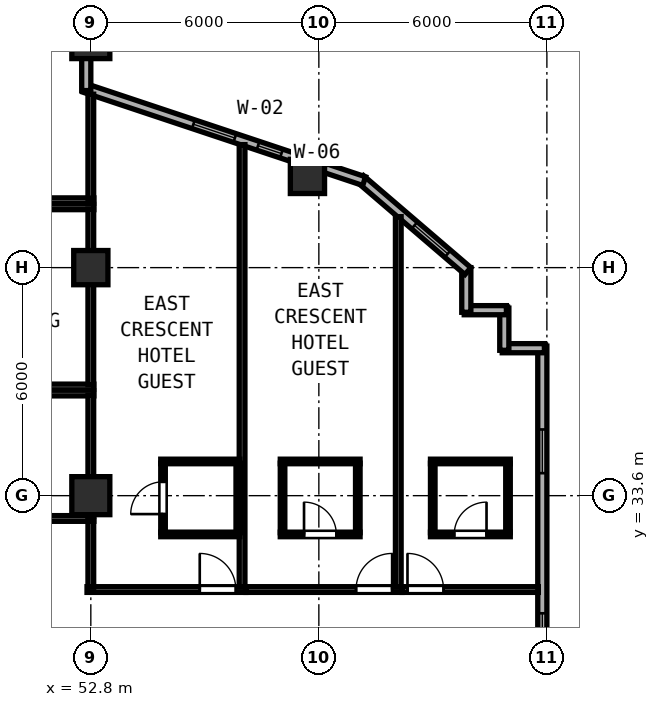
"""IFC4 building model, lengths in metres.
Left out: names, types, materials, properties, quantities, classifications, styles, units other than length and angle.
Written with IfcOpenShell. Run it as: python <this file> out.ifc"""

import sys

from ifc_helpers import new_model, si_unit, direction, frame, frame_2d, origin, origin_2d, place, context, subcontext, project, spatial, rectangle, hollow_rectangle, extrude, element, fill, save


model = new_model("IFC4")
c1 = context("Model", 3, precision=1e-05, world=origin(), true_north=direction((0.0, 1.0)))
c2 = subcontext(c1, "Body", "Model", "MODEL_VIEW")
j1 = project(units=[si_unit("LENGTHUNIT", "METRE"), si_unit("PLANEANGLEUNIT", "RADIAN")], contexts=[c1])
p1 = place(None, origin())
s1 = spatial("IfcSite", under=j1, at=p1, CompositionType="ELEMENT")
p2 = place(p1, origin())
s2 = spatial("IfcBuilding", under=s1, at=p2, CompositionType="ELEMENT")
p3 = place(p2, frame((0.0, 0.0, 121.2)))
s3 = spatial("IfcBuildingStorey", under=s2, at=p3, CompositionType="ELEMENT", Elevation=121.2)
for number, where, z_axis, x_axis in (
    (1, (52.8, 33.6, 0.0), (0.0, 0.0, 1.0), (1.0, 0.0, 0.0)),
    (2, (52.8, 45.6, 0.0), (0.0, 0.0, 1.0), (1.0, 0.0, 0.0)),
):
    element("IfcColumn", number, at=place(p3, frame(where, z_axis=z_axis, x_axis=x_axis)), inside=s3, PredefinedType="COLUMN", context=c2, shape_type="SweptSolid", body=[
        extrude(hollow_rectangle(XDim=1.0, YDim=1.0, WallThickness=0.038, at=origin_2d()), origin(), (0.0, 0.0, 1.0), 3.8),
    ])
for number, where, z_axis, x_axis in (
    (3, (52.8, 39.6, 0.0), (0.0, 0.0, 1.0), (1.0, 0.0, 0.0)),
    (4, (58.5, 42.0, 0.0), (0.0, 0.0, 1.0), (1.0, 0.0, 0.0)),
):
    element("IfcColumn", number, at=place(p3, frame(where, z_axis=z_axis, x_axis=x_axis)), inside=s3, PredefinedType="COLUMN", context=c2, shape_type="SweptSolid", body=[
        extrude(hollow_rectangle(XDim=0.9, YDim=0.9, WallThickness=0.034, at=origin_2d()), origin(), (0.0, 0.0, 1.0), 3.8),
    ])
p4 = place(p3, frame((64.68, 28.092, 0.0), z_axis=(0.0, 0.0, 1.0), x_axis=(0.0, 1.0, 0.0)))
e5 = element("IfcWall", 5, at=p4, inside=s3, PredefinedType="SOLIDWALL", context=c2, shape_type="SweptSolid", body=[
    extrude(rectangle(XDim=9.443, YDim=0.24, at=frame_2d((4.721, 0.0))), origin(), (0.0, 0.0, 1.0), 3.6),
])
p5 = place(p4, frame((1.263, 0.0, 0.85)))
e6 = element("IfcOpeningElement", 6, at=p5, cuts=e5, PredefinedType="OPENING", context=c2, shape_type="SweptSolid", body=[
    extrude(rectangle(XDim=1.15, YDim=1.8, at=frame_2d((0.575, 0.9))), frame((0.0, 0.13, 0.0), z_axis=(0.0, -1.0, 0.0), x_axis=(1.0, 0.0, 0.0)), (0.0, 0.0, 1.0), 0.26),
])
p6 = place(p4, frame((6.1, 0.0, 0.85)))
e7 = element("IfcOpeningElement", 7, at=p6, cuts=e5, PredefinedType="OPENING", context=c2, shape_type="SweptSolid", body=[
    extrude(rectangle(XDim=1.15, YDim=1.8, at=frame_2d((0.575, 0.9))), frame((0.0, 0.13, 0.0), z_axis=(0.0, -1.0, 0.0), x_axis=(1.0, 0.0, 0.0)), (0.0, 0.0, 1.0), 0.26),
])
p7 = place(p3, frame((64.735, 37.48, 0.0), z_axis=(0.0, 0.0, 1.0), x_axis=(-1.0, 0.0, 0.0)))
e8 = element("IfcWall", 8, at=p7, inside=s3, PredefinedType="SOLIDWALL", context=c2, shape_type="SweptSolid", body=[
    extrude(rectangle(XDim=1.11, YDim=0.24, at=frame_2d((0.555, 0.0))), origin(), (0.0, 0.0, 1.0), 3.6),
])
p8 = place(p3, frame((63.68, 37.425, 0.0), z_axis=(0.0, 0.0, 1.0), x_axis=(0.0, 1.0, 0.0)))
e9 = element("IfcWall", 9, at=p8, inside=s3, PredefinedType="SOLIDWALL", context=c2, shape_type="SweptSolid", body=[
    extrude(rectangle(XDim=1.11, YDim=0.24, at=frame_2d((0.555, 0.0))), origin(), (0.0, 0.0, 1.0), 3.6),
])
p9 = place(p3, frame((63.735, 38.48, 0.0), z_axis=(0.0, 0.0, 1.0), x_axis=(-1.0, 0.0, 0.0)))
e10 = element("IfcWall", 10, at=p9, inside=s3, PredefinedType="SOLIDWALL", context=c2, shape_type="SweptSolid", body=[
    extrude(rectangle(XDim=1.11, YDim=0.24, at=frame_2d((0.555, 0.0))), origin(), (0.0, 0.0, 1.0), 3.6),
])
p10 = place(p3, frame((62.68, 38.425, 0.0), z_axis=(0.0, 0.0, 1.0), x_axis=(0.0, 1.0, 0.0)))
e11 = element("IfcWall", 11, at=p10, inside=s3, PredefinedType="SOLIDWALL", context=c2, shape_type="SweptSolid", body=[
    extrude(rectangle(XDim=1.175, YDim=0.24, at=frame_2d((0.587, 0.0))), origin(), (0.0, 0.0, 1.0), 3.6),
])
p11 = place(p3, frame((62.722, 39.509, 0.0), z_axis=(0.0, 0.0, 1.0), x_axis=(-0.759247334792, 0.650802185469, 0.0)))
e12 = element("IfcWall", 12, at=p11, inside=s3, PredefinedType="SOLIDWALL", context=c2, shape_type="SweptSolid", body=[
    extrude(rectangle(XDim=3.719, YDim=0.24, at=frame_2d((1.86, 0.0))), origin(), (0.0, 0.0, 1.0), 3.6),
])
p12 = place(p11, frame((0.7, 0.0, 0.85)))
e13 = element("IfcOpeningElement", 13, at=p12, cuts=e12, PredefinedType="OPENING", context=c2, shape_type="SweptSolid", body=[
    extrude(rectangle(XDim=1.15, YDim=1.8, at=frame_2d((0.575, 0.9))), frame((0.0, 0.13, 0.0), z_axis=(0.0, -1.0, 0.0), x_axis=(1.0, 0.0, 0.0)), (0.0, 0.0, 1.0), 0.26),
])
p13 = place(p3, frame((59.992, 41.876, 0.0), z_axis=(0.0, 0.0, 1.0), x_axis=(-0.948661238983, 0.316293935527, 0.0)))
e14 = element("IfcWall", 14, at=p13, inside=s3, PredefinedType="SOLIDWALL", context=c2, shape_type="SweptSolid", body=[
    extrude(rectangle(XDim=1.107, YDim=0.24, at=frame_2d((0.553, 0.0))), origin(), (0.0, 0.0, 1.0), 3.6),
])
p14 = place(p3, frame((58.295, 42.442, 0.0), z_axis=(0.0, 0.0, 1.0), x_axis=(-0.948687385027, 0.316215504823, 0.0)))
e15 = element("IfcWall", 15, at=p14, inside=s3, PredefinedType="SOLIDWALL", context=c2, shape_type="SweptSolid", body=[
    extrude(rectangle(XDim=5.973, YDim=0.24, at=frame_2d((2.987, 0.0))), origin(), (0.0, 0.0, 1.0), 3.145),
])
p15 = place(p14, frame((1.796, 0.0, 0.85)))
e16 = element("IfcOpeningElement", 16, at=p15, cuts=e15, PredefinedType="OPENING", context=c2, shape_type="SweptSolid", body=[
    extrude(rectangle(XDim=1.15, YDim=1.8, at=frame_2d((0.575, 0.9))), frame((0.0, 0.13, 0.0), z_axis=(0.0, -1.0, 0.0), x_axis=(1.0, 0.0, 0.0)), (0.0, 0.0, 1.0), 0.26),
])
p16 = place(p14, frame((0.505, 0.0, 0.85)))
e17 = element("IfcOpeningElement", 17, at=p16, cuts=e15, PredefinedType="OPENING", context=c2, shape_type="SweptSolid", body=[
    extrude(rectangle(XDim=0.65, YDim=1.75, at=frame_2d((0.325, 0.875))), frame((0.0, 0.13, 0.0), z_axis=(0.0, -1.0, 0.0), x_axis=(1.0, 0.0, 0.0)), (0.0, 0.0, 1.0), 0.26),
])
p17 = place(p3, frame((52.68, 44.259, 0.0), z_axis=(0.0, 0.0, 1.0), x_axis=(0.0, 1.0, 0.0)))
e18 = element("IfcWall", 18, at=p17, inside=s3, PredefinedType="SOLIDWALL", context=c2, shape_type="SweptSolid", body=[
    extrude(rectangle(XDim=0.849, YDim=0.24, at=frame_2d((0.425, 0.0))), origin(), (0.0, 0.0, 1.0), 3.145),
])
for number, where, z_axis, x_axis in (
    (19, (49.08, 36.3, 0.0), (0.0, 0.0, 1.0), (1.0, 0.0, 0.0)),
    (20, (49.08, 33.0, 0.0), (0.0, 0.0, 1.0), (1.0, 0.0, 0.0)),
):
    element("IfcWall", number, at=place(p3, frame(where, z_axis=z_axis, x_axis=x_axis)), inside=s3, PredefinedType="PARTITIONING", context=c2, shape_type="SweptSolid", body=[
        extrude(rectangle(XDim=3.8, YDim=0.15, at=frame_2d((1.9, 0.0))), origin(), (0.0, 0.0, 1.0), 3.6),
    ])
p18 = place(p3, frame((52.8, 33.06, 0.0), z_axis=(0.0, 0.0, 1.0), x_axis=(0.0, 1.0, 0.0)))
e21 = element("IfcWall", 21, at=p18, inside=s3, PredefinedType="PARTITIONING", context=c2, shape_type="SweptSolid", body=[
    extrude(rectangle(XDim=3.18, YDim=0.15, at=frame_2d((1.59, 0.0))), origin(), (0.0, 0.0, 1.0), 3.145),
])
for number, where, z_axis, x_axis in (
    (22, (49.08, 41.2, 0.0), (0.0, 0.0, 1.0), (1.0, 0.0, 0.0)),
    (23, (49.08, 36.46, 0.0), (0.0, 0.0, 1.0), (1.0, 0.0, 0.0)),
):
    element("IfcWall", number, at=place(p3, frame(where, z_axis=z_axis, x_axis=x_axis)), inside=s3, PredefinedType="PARTITIONING", context=c2, shape_type="SweptSolid", body=[
        extrude(rectangle(XDim=3.8, YDim=0.15, at=frame_2d((1.9, 0.0))), origin(), (0.0, 0.0, 1.0), 3.6),
    ])
p19 = place(p3, frame((52.8, 36.52, 0.0), z_axis=(0.0, 0.0, 1.0), x_axis=(0.0, 1.0, 0.0)))
e24 = element("IfcWall", 24, at=p19, inside=s3, PredefinedType="PARTITIONING", context=c2, shape_type="SweptSolid", body=[
    extrude(rectangle(XDim=4.62, YDim=0.15, at=frame_2d((2.31, 0.0))), origin(), (0.0, 0.0, 1.0), 3.145),
])
p20 = place(p3, frame((49.08, 41.36, 0.0), z_axis=(0.0, 0.0, 1.0), x_axis=(1.0, 0.0, 0.0)))
e25 = element("IfcWall", 25, at=p20, inside=s3, PredefinedType="PARTITIONING", context=c2, shape_type="SweptSolid", body=[
    extrude(rectangle(XDim=3.8, YDim=0.15, at=frame_2d((1.9, 0.0))), origin(), (0.0, 0.0, 1.0), 3.6),
])
p21 = place(p3, frame((52.8, 41.42, 0.0), z_axis=(0.0, 0.0, 1.0), x_axis=(0.0, 1.0, 0.0)))
e26 = element("IfcWall", 26, at=p21, inside=s3, PredefinedType="PARTITIONING", context=c2, shape_type="SweptSolid", body=[
    extrude(rectangle(XDim=2.743, YDim=0.15, at=frame_2d((1.372, 0.0))), origin(), (0.0, 0.0, 1.0), 3.145),
])
p22 = place(p3, frame((52.7, 31.13, 0.0), z_axis=(0.0, 0.0, 1.0), x_axis=(1.0, 0.0, 0.0)))
e27 = element("IfcWall", 27, at=p22, inside=s3, PredefinedType="PARTITIONING", context=c2, shape_type="SweptSolid", body=[
    extrude(rectangle(XDim=4.18, YDim=0.15, at=frame_2d((2.09, 0.0))), origin(), (0.0, 0.0, 1.0), 3.6),
])
p23 = place(p22, frame((2.966, 0.0, 0.0)))
e28 = element("IfcOpeningElement", 28, at=p23, cuts=e27, PredefinedType="OPENING", context=c2, shape_type="SweptSolid", body=[
    extrude(rectangle(XDim=0.95, YDim=2.15, at=frame_2d((0.475, 1.075))), frame((0.0, 0.085, 0.0), z_axis=(0.0, -1.0, 0.0), x_axis=(1.0, 0.0, 0.0)), (0.0, 0.0, 1.0), 0.17),
])
p24 = place(p3, frame((52.8, 31.19, 0.0), z_axis=(0.0, 0.0, 1.0), x_axis=(0.0, 1.0, 0.0)))
e29 = element("IfcWall", 29, at=p24, inside=s3, PredefinedType="PARTITIONING", context=c2, shape_type="SweptSolid", body=[
    extrude(rectangle(XDim=1.75, YDim=0.15, at=frame_2d((0.875, 0.0))), origin(), (0.0, 0.0, 1.0), 3.145),
])
p25 = place(p3, frame((56.78, 31.19, 0.0), z_axis=(0.0, 0.0, 1.0), x_axis=(0.0, 1.0, 0.0)))
e30 = element("IfcWall", 30, at=p25, inside=s3, PredefinedType="PARTITIONING", context=c2, shape_type="SweptSolid", body=[
    extrude(rectangle(XDim=11.646, YDim=0.15, at=frame_2d((5.823, 0.0))), origin(), (0.0, 0.0, 1.0), 3.6),
])
for number, where, z_axis, x_axis in (
    (31, (54.64, 34.5, 0.0), (0.0, 0.0, 1.0), (1.0, 0.0, 0.0)),
    (32, (54.64, 32.58, 0.0), (0.0, 0.0, 1.0), (1.0, 0.0, 0.0)),
):
    element("IfcWall", number, at=place(p3, frame(where, z_axis=z_axis, x_axis=x_axis)), inside=s3, PredefinedType="PARTITIONING", context=c2, shape_type="SweptSolid", body=[
        extrude(rectangle(XDim=2.08, YDim=0.12, at=frame_2d((1.04, 0.0))), origin(), (0.0, 0.0, 1.0), 3.6),
    ])
p26 = place(p3, frame((54.7, 32.625, 0.0), z_axis=(0.0, 0.0, 1.0), x_axis=(0.0, 1.0, 0.0)))
e33 = element("IfcWall", 33, at=p26, inside=s3, PredefinedType="PARTITIONING", context=c2, shape_type="SweptSolid", body=[
    extrude(rectangle(XDim=1.83, YDim=0.12, at=frame_2d((0.915, 0.0))), origin(), (0.0, 0.0, 1.0), 3.6),
])
p27 = place(p26, frame((1.34, 0.0, 0.0), z_axis=(0.0, 0.0, 1.0), x_axis=(-1.0, 0.0, 0.0)))
e34 = element("IfcOpeningElement", 34, at=p27, cuts=e33, PredefinedType="OPENING", context=c2, shape_type="SweptSolid", body=[
    extrude(rectangle(XDim=0.85, YDim=2.1, at=frame_2d((0.425, 1.05))), frame((0.0, 0.07, 0.0), z_axis=(0.0, -1.0, 0.0), x_axis=(1.0, 0.0, 0.0)), (0.0, 0.0, 1.0), 0.14),
])
p28 = place(p3, frame((56.68, 32.625, 0.0), z_axis=(0.0, 0.0, 1.0), x_axis=(0.0, 1.0, 0.0)))
e35 = element("IfcWall", 35, at=p28, inside=s3, PredefinedType="PARTITIONING", context=c2, shape_type="SweptSolid", body=[
    extrude(rectangle(XDim=1.83, YDim=0.12, at=frame_2d((0.915, 0.0))), origin(), (0.0, 0.0, 1.0), 3.6),
])
p29 = place(p3, frame((56.882, 31.13, 0.0), z_axis=(0.0, 0.0, 1.0), x_axis=(1.0, 0.0, 0.0)))
e36 = element("IfcWall", 36, at=p29, inside=s3, PredefinedType="PARTITIONING", context=c2, shape_type="SweptSolid", body=[
    extrude(rectangle(XDim=4.108, YDim=0.15, at=frame_2d((2.054, 0.0))), origin(), (0.0, 0.0, 1.0), 3.6),
])
p30 = place(p29, frame((2.896, 0.0, 0.0)))
e37 = element("IfcOpeningElement", 37, at=p30, cuts=e36, PredefinedType="OPENING", context=c2, shape_type="SweptSolid", body=[
    extrude(rectangle(XDim=0.95, YDim=2.15, at=frame_2d((0.475, 1.075))), frame((0.0, 0.085, 0.0), z_axis=(0.0, -1.0, 0.0), x_axis=(1.0, 0.0, 0.0)), (0.0, 0.0, 1.0), 0.17),
])
p31 = place(p3, frame((60.89, 31.19, 0.0), z_axis=(0.0, 0.0, 1.0), x_axis=(0.0, 1.0, 0.0)))
e38 = element("IfcWall", 38, at=p31, inside=s3, PredefinedType="PARTITIONING", context=c2, shape_type="SweptSolid", body=[
    extrude(rectangle(XDim=9.751, YDim=0.15, at=frame_2d((4.875, 0.0))), origin(), (0.0, 0.0, 1.0), 3.6),
])
p32 = place(p3, frame((57.785, 34.5, 0.0), z_axis=(0.0, 0.0, 1.0), x_axis=(1.0, 0.0, 0.0)))
e39 = element("IfcWall", 39, at=p32, inside=s3, PredefinedType="PARTITIONING", context=c2, shape_type="SweptSolid", body=[
    extrude(rectangle(XDim=2.1, YDim=0.12, at=frame_2d((1.05, 0.0))), origin(), (0.0, 0.0, 1.0), 3.6),
])
p33 = place(p3, frame((57.785, 32.58, 0.0), z_axis=(0.0, 0.0, 1.0), x_axis=(1.0, 0.0, 0.0)))
e40 = element("IfcWall", 40, at=p33, inside=s3, PredefinedType="PARTITIONING", context=c2, shape_type="SweptSolid", body=[
    extrude(rectangle(XDim=2.1, YDim=0.12, at=frame_2d((1.05, 0.0))), origin(), (0.0, 0.0, 1.0), 3.6),
])
p34 = place(p33, frame((0.625, 0.0, 0.0)))
e41 = element("IfcOpeningElement", 41, at=p34, cuts=e40, PredefinedType="OPENING", context=c2, shape_type="SweptSolid", body=[
    extrude(rectangle(XDim=0.85, YDim=2.1, at=frame_2d((0.425, 1.05))), frame((0.0, 0.07, 0.0), z_axis=(0.0, -1.0, 0.0), x_axis=(1.0, 0.0, 0.0)), (0.0, 0.0, 1.0), 0.14),
])
for number, where, z_axis, x_axis in (
    (42, (57.845, 32.625, 0.0), (0.0, 0.0, 1.0), (0.0, 1.0, 0.0)),
    (43, (59.825, 32.625, 0.0), (0.0, 0.0, 1.0), (0.0, 1.0, 0.0)),
):
    element("IfcWall", number, at=place(p3, frame(where, z_axis=z_axis, x_axis=x_axis)), inside=s3, PredefinedType="PARTITIONING", context=c2, shape_type="SweptSolid", body=[
        extrude(rectangle(XDim=1.83, YDim=0.12, at=frame_2d((0.915, 0.0))), origin(), (0.0, 0.0, 1.0), 3.6),
    ])
p35 = place(p3, frame((60.992, 31.13, 0.0), z_axis=(0.0, 0.0, 1.0), x_axis=(1.0, 0.0, 0.0)))
e44 = element("IfcWall", 44, at=p35, inside=s3, PredefinedType="PARTITIONING", context=c2, shape_type="SweptSolid", body=[
    extrude(rectangle(XDim=3.583, YDim=0.15, at=frame_2d((1.792, 0.0))), origin(), (0.0, 0.0, 1.0), 3.6),
])
p36 = place(p35, frame((0.14, 0.0, 0.0)))
e45 = element("IfcOpeningElement", 45, at=p36, cuts=e44, PredefinedType="OPENING", context=c2, shape_type="SweptSolid", body=[
    extrude(rectangle(XDim=0.95, YDim=2.15, at=frame_2d((0.475, 1.075))), frame((0.0, 0.085, 0.0), z_axis=(0.0, -1.0, 0.0), x_axis=(1.0, 0.0, 0.0)), (0.0, 0.0, 1.0), 0.17),
])
p37 = place(p3, frame((61.737, 34.5, 0.0), z_axis=(0.0, 0.0, 1.0), x_axis=(1.0, 0.0, 0.0)))
e46 = element("IfcWall", 46, at=p37, inside=s3, PredefinedType="PARTITIONING", context=c2, shape_type="SweptSolid", body=[
    extrude(rectangle(XDim=2.1, YDim=0.12, at=frame_2d((1.05, 0.0))), origin(), (0.0, 0.0, 1.0), 3.6),
])
p38 = place(p3, frame((61.737, 32.58, 0.0), z_axis=(0.0, 0.0, 1.0), x_axis=(1.0, 0.0, 0.0)))
e47 = element("IfcWall", 47, at=p38, inside=s3, PredefinedType="PARTITIONING", context=c2, shape_type="SweptSolid", body=[
    extrude(rectangle(XDim=2.1, YDim=0.12, at=frame_2d((1.05, 0.0))), origin(), (0.0, 0.0, 1.0), 3.6),
])
p39 = place(p38, frame((0.625, 0.0, 0.0)))
e48 = element("IfcOpeningElement", 48, at=p39, cuts=e47, PredefinedType="OPENING", context=c2, shape_type="SweptSolid", body=[
    extrude(rectangle(XDim=0.85, YDim=2.1, at=frame_2d((0.425, 1.05))), frame((0.0, 0.07, 0.0), z_axis=(0.0, -1.0, 0.0), x_axis=(1.0, 0.0, 0.0)), (0.0, 0.0, 1.0), 0.14),
])
for number, where, z_axis, x_axis in (
    (49, (61.797, 32.625, 0.0), (0.0, 0.0, 1.0), (0.0, 1.0, 0.0)),
    (50, (63.777, 32.625, 0.0), (0.0, 0.0, 1.0), (0.0, 1.0, 0.0)),
):
    element("IfcWall", number, at=place(p3, frame(where, z_axis=z_axis, x_axis=x_axis)), inside=s3, PredefinedType="PARTITIONING", context=c2, shape_type="SweptSolid", body=[
        extrude(rectangle(XDim=1.83, YDim=0.12, at=frame_2d((0.915, 0.0))), origin(), (0.0, 0.0, 1.0), 3.6),
    ])
p40 = place(p5, origin())
e51 = element("IfcWindow", 51, at=p40, inside=s3, PartitioningType="SINGLE_PANEL", PredefinedType="WINDOW", context=c2, shape_type="SweptSolid", body=[
    extrude(rectangle(XDim=1.15, YDim=1.8, at=frame_2d((0.575, 0.9))), frame((0.0, 0.03, 0.0), z_axis=(0.0, -1.0, 0.0), x_axis=(1.0, 0.0, 0.0)), (0.0, 0.0, 1.0), 0.06),
])
fill(e6, e51)
p41 = place(p6, origin())
e52 = element("IfcWindow", 52, at=p41, inside=s3, PartitioningType="SINGLE_PANEL", PredefinedType="WINDOW", context=c2, shape_type="SweptSolid", body=[
    extrude(rectangle(XDim=1.15, YDim=1.8, at=frame_2d((0.575, 0.9))), frame((0.0, 0.03, 0.0), z_axis=(0.0, -1.0, 0.0), x_axis=(1.0, 0.0, 0.0)), (0.0, 0.0, 1.0), 0.06),
])
fill(e7, e52)
p42 = place(p12, origin())
e53 = element("IfcWindow", 53, at=p42, inside=s3, PartitioningType="SINGLE_PANEL", PredefinedType="WINDOW", context=c2, shape_type="SweptSolid", body=[
    extrude(rectangle(XDim=1.15, YDim=1.8, at=frame_2d((0.575, 0.9))), frame((0.0, 0.03, 0.0), z_axis=(0.0, -1.0, 0.0), x_axis=(1.0, 0.0, 0.0)), (0.0, 0.0, 1.0), 0.06),
])
fill(e13, e53)
p43 = place(p15, origin())
e54 = element("IfcWindow", 54, at=p43, inside=s3, PartitioningType="SINGLE_PANEL", PredefinedType="WINDOW", context=c2, shape_type="SweptSolid", body=[
    extrude(rectangle(XDim=1.15, YDim=1.8, at=frame_2d((0.575, 0.9))), frame((0.0, 0.03, 0.0), z_axis=(0.0, -1.0, 0.0), x_axis=(1.0, 0.0, 0.0)), (0.0, 0.0, 1.0), 0.06),
])
fill(e16, e54)
p44 = place(p23, origin())
e55 = element("IfcDoor", 55, at=p44, inside=s3, OperationType="SINGLE_SWING_LEFT", PredefinedType="DOOR", context=c2, shape_type="SweptSolid", body=[
    extrude(rectangle(XDim=0.95, YDim=2.15, at=frame_2d((0.475, 1.075))), frame((0.0, 0.025, 0.0), z_axis=(0.0, -1.0, 0.0), x_axis=(1.0, 0.0, 0.0)), (0.0, 0.0, 1.0), 0.05),
])
fill(e28, e55)
p45 = place(p27, origin())
e56 = element("IfcDoor", 56, at=p45, inside=s3, OperationType="SINGLE_SWING_RIGHT", PredefinedType="DOOR", context=c2, shape_type="SweptSolid", body=[
    extrude(rectangle(XDim=0.85, YDim=2.1, at=frame_2d((0.425, 1.05))), frame((0.0, 0.025, 0.0), z_axis=(0.0, -1.0, 0.0), x_axis=(1.0, 0.0, 0.0)), (0.0, 0.0, 1.0), 0.05),
])
fill(e34, e56)
p46 = place(p30, origin())
e57 = element("IfcDoor", 57, at=p46, inside=s3, OperationType="SINGLE_SWING_RIGHT", PredefinedType="DOOR", context=c2, shape_type="SweptSolid", body=[
    extrude(rectangle(XDim=0.95, YDim=2.15, at=frame_2d((0.475, 1.075))), frame((0.0, 0.025, 0.0), z_axis=(0.0, -1.0, 0.0), x_axis=(1.0, 0.0, 0.0)), (0.0, 0.0, 1.0), 0.05),
])
fill(e37, e57)
p47 = place(p34, origin())
e58 = element("IfcDoor", 58, at=p47, inside=s3, OperationType="SINGLE_SWING_LEFT", PredefinedType="DOOR", context=c2, shape_type="SweptSolid", body=[
    extrude(rectangle(XDim=0.85, YDim=2.1, at=frame_2d((0.425, 1.05))), frame((0.0, 0.025, 0.0), z_axis=(0.0, -1.0, 0.0), x_axis=(1.0, 0.0, 0.0)), (0.0, 0.0, 1.0), 0.05),
])
fill(e41, e58)
p48 = place(p36, origin())
e59 = element("IfcDoor", 59, at=p48, inside=s3, OperationType="SINGLE_SWING_LEFT", PredefinedType="DOOR", context=c2, shape_type="SweptSolid", body=[
    extrude(rectangle(XDim=0.95, YDim=2.15, at=frame_2d((0.475, 1.075))), frame((0.0, 0.025, 0.0), z_axis=(0.0, -1.0, 0.0), x_axis=(1.0, 0.0, 0.0)), (0.0, 0.0, 1.0), 0.05),
])
fill(e45, e59)
p49 = place(p39, origin())
e60 = element("IfcDoor", 60, at=p49, inside=s3, OperationType="SINGLE_SWING_RIGHT", PredefinedType="DOOR", context=c2, shape_type="SweptSolid", body=[
    extrude(rectangle(XDim=0.85, YDim=2.1, at=frame_2d((0.425, 1.05))), frame((0.0, 0.025, 0.0), z_axis=(0.0, -1.0, 0.0), x_axis=(1.0, 0.0, 0.0)), (0.0, 0.0, 1.0), 0.05),
])
fill(e48, e60)
p50 = place(p16, origin())
e61 = element("IfcWindow", 61, at=p50, inside=s3, PartitioningType="SINGLE_PANEL", PredefinedType="WINDOW", context=c2, shape_type="SweptSolid", body=[
    extrude(rectangle(XDim=0.65, YDim=1.75, at=frame_2d((0.325, 0.875))), frame((0.0, 0.03, 0.0), z_axis=(0.0, -1.0, 0.0), x_axis=(1.0, 0.0, 0.0)), (0.0, 0.0, 1.0), 0.06),
])
fill(e17, e61)
save(model, sys.argv[1])
